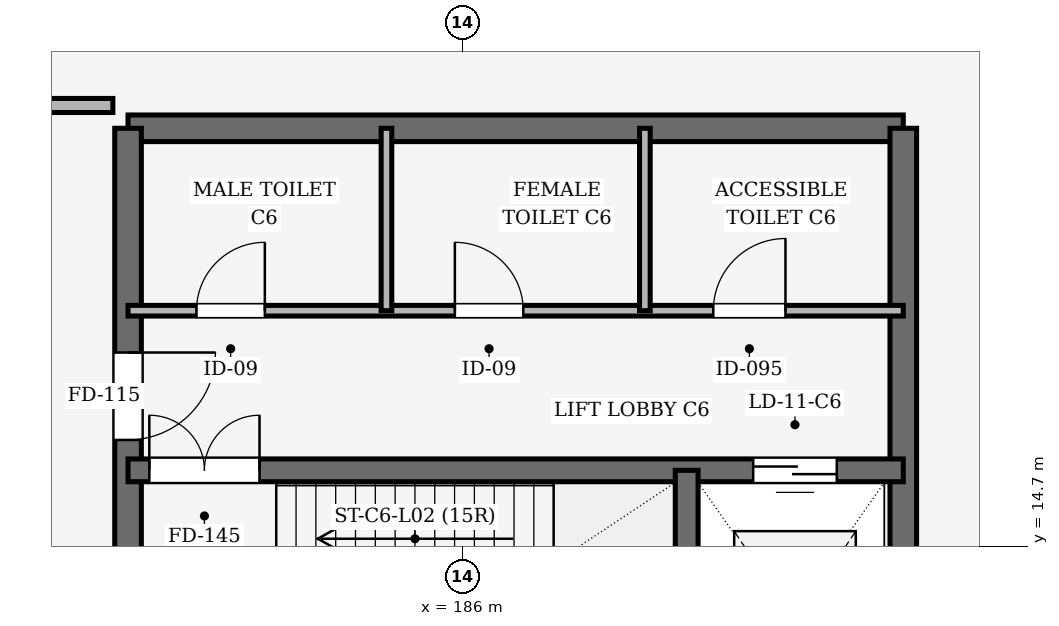
"""IFC4 building model, lengths in metres.
Left out: names, types, materials, properties, quantities, classifications, styles, units other than length and angle.
Written with IfcOpenShell. Run it as: python <this file> out.ifc"""

import sys

from ifc_helpers import new_model, si_unit, direction, frame, frame_2d, origin, place, context, subcontext, project, spatial, rectangle, extrude, element, fill, save


model = new_model("IFC4")
c1 = context("Model", 3, precision=1e-05, world=origin(), true_north=direction((0.0, 1.0)))
c2 = subcontext(c1, "Body", "Model", "MODEL_VIEW")
j1 = project(units=[si_unit("LENGTHUNIT", "METRE"), si_unit("PLANEANGLEUNIT", "RADIAN")], contexts=[c1])
p1 = place(None, origin())
s1 = spatial("IfcSite", under=j1, at=p1, CompositionType="ELEMENT")
p2 = place(p1, origin())
s2 = spatial("IfcBuilding", under=s1, at=p2, CompositionType="ELEMENT")
p3 = place(p2, frame((0.0, 0.0, 10.8)))
s3 = spatial("IfcBuildingStorey", under=s2, at=p3, CompositionType="ELEMENT", Elevation=10.8)
p4 = place(p3, frame((191.8, 20.2, 0.0), z_axis=(0.0, 0.0, 1.0), x_axis=(-1.0, 0.0, 0.0)))
e1 = element("IfcWall", 1, at=p4, inside=s3, PredefinedType="SHEAR", context=c2, shape_type="SweptSolid", body=[
    extrude(rectangle(XDim=10.2, YDim=0.35, at=frame_2d((5.1, 0.0))), origin(), (0.0, 0.0, 1.0), 5.4),
])
p5 = place(p3, frame((181.6, 20.2, 0.0), z_axis=(0.0, 0.0, 1.0), x_axis=(0.0, -1.0, 0.0)))
e2 = element("IfcWall", 2, at=p5, inside=s3, PredefinedType="SHEAR", context=c2, shape_type="SweptSolid", body=[
    extrude(rectangle(XDim=8.4, YDim=0.35, at=frame_2d((4.2, 0.0))), origin(), (0.0, 0.0, 1.0), 5.4),
])
p6 = place(p5, frame((2.95, 0.0, 0.0)))
e3 = element("IfcOpeningElement", 3, at=p6, cuts=e2, PredefinedType="OPENING", context=c2, shape_type="SweptSolid", body=[
    extrude(rectangle(XDim=1.15, YDim=2.15, at=frame_2d((0.575, 1.075))), frame((0.0, 0.185, 0.0), z_axis=(0.0, -1.0, 0.0), x_axis=(1.0, 0.0, 0.0)), (0.0, 0.0, 1.0), 0.37),
])
p7 = place(p3, frame((191.8, 11.8, 0.0), z_axis=(0.0, 0.0, 1.0), x_axis=(0.0, 1.0, 0.0)))
e4 = element("IfcWall", 4, at=p7, inside=s3, PredefinedType="SHEAR", context=c2, shape_type="SweptSolid", body=[
    extrude(rectangle(XDim=8.4, YDim=0.35, at=frame_2d((4.2, 0.0))), origin(), (0.0, 0.0, 1.0), 5.4),
])
p8 = place(p3, frame((181.6, 15.7, 0.0), z_axis=(0.0, 0.0, 1.0), x_axis=(1.0, 0.0, 0.0)))
e5 = element("IfcWall", 5, at=p8, inside=s3, PredefinedType="SHEAR", context=c2, shape_type="SweptSolid", body=[
    extrude(rectangle(XDim=10.2, YDim=0.3, at=frame_2d((5.1, 0.0))), origin(), (0.0, 0.0, 1.0), 5.4),
])
p9 = place(p8, frame((0.28, 0.0, 0.0)))
e6 = element("IfcOpeningElement", 6, at=p9, cuts=e5, PredefinedType="OPENING", context=c2, shape_type="SweptSolid", body=[
    extrude(rectangle(XDim=1.45, YDim=2.15, at=frame_2d((0.725, 1.075))), frame((0.0, 0.16, 0.0), z_axis=(0.0, -1.0, 0.0), x_axis=(1.0, 0.0, 0.0)), (0.0, 0.0, 1.0), 0.32),
])
p10 = place(p8, frame((8.225, 0.0, 0.0)))
e7 = element("IfcOpeningElement", 7, at=p10, cuts=e5, PredefinedType="OPENING", context=c2, shape_type="SweptSolid", body=[
    extrude(rectangle(XDim=1.1, YDim=2.15, at=frame_2d((0.55, 1.075))), frame((0.0, 0.16, 0.0), z_axis=(0.0, -1.0, 0.0), x_axis=(1.0, 0.0, 0.0)), (0.0, 0.0, 1.0), 0.32),
])
p11 = place(p3, frame((188.95, 11.8, 0.0), z_axis=(0.0, 0.0, 1.0), x_axis=(0.0, 1.0, 0.0)))
e8 = element("IfcWall", 8, at=p11, inside=s3, PredefinedType="SHEAR", context=c2, shape_type="SweptSolid", body=[
    extrude(rectangle(XDim=3.9, YDim=0.3, at=frame_2d((1.95, 0.0))), origin(), (0.0, 0.0, 1.0), 5.4),
])
p12 = place(p3, frame((181.6, 17.8, 0.0), z_axis=(0.0, 0.0, 1.0), x_axis=(1.0, 0.0, 0.0)))
e9 = element("IfcWall", 9, at=p12, inside=s3, PredefinedType="PARTITIONING", context=c2, shape_type="SweptSolid", body=[
    extrude(rectangle(XDim=10.2, YDim=0.14, at=frame_2d((5.1, 0.0))), origin(), (0.0, 0.0, 1.0), 4.435),
])
p13 = place(p12, frame((0.9, 0.0, 0.0)))
e10 = element("IfcOpeningElement", 10, at=p13, cuts=e9, PredefinedType="OPENING", context=c2, shape_type="SweptSolid", body=[
    extrude(rectangle(XDim=0.9, YDim=2.1, at=frame_2d((0.45, 1.05))), frame((0.0, 0.08, 0.0), z_axis=(0.0, -1.0, 0.0), x_axis=(1.0, 0.0, 0.0)), (0.0, 0.0, 1.0), 0.16),
])
p14 = place(p12, frame((4.3, 0.0, 0.0)))
e11 = element("IfcOpeningElement", 11, at=p14, cuts=e9, PredefinedType="OPENING", context=c2, shape_type="SweptSolid", body=[
    extrude(rectangle(XDim=0.9, YDim=2.1, at=frame_2d((0.45, 1.05))), frame((0.0, 0.08, 0.0), z_axis=(0.0, -1.0, 0.0), x_axis=(1.0, 0.0, 0.0)), (0.0, 0.0, 1.0), 0.16),
])
p15 = place(p12, frame((7.7, 0.0, 0.0)))
e12 = element("IfcOpeningElement", 12, at=p15, cuts=e9, PredefinedType="OPENING", context=c2, shape_type="SweptSolid", body=[
    extrude(rectangle(XDim=0.95, YDim=2.1, at=frame_2d((0.475, 1.05))), frame((0.0, 0.08, 0.0), z_axis=(0.0, -1.0, 0.0), x_axis=(1.0, 0.0, 0.0)), (0.0, 0.0, 1.0), 0.16),
])
for number, where, z_axis, x_axis in (
    (13, (185.0, 17.8, 0.0), (0.0, 0.0, 1.0), (0.0, 1.0, 0.0)),
    (14, (188.4, 17.8, 0.0), (0.0, 0.0, 1.0), (0.0, 1.0, 0.0)),
):
    element("IfcWall", number, at=place(p3, frame(where, z_axis=z_axis, x_axis=x_axis)), inside=s3, PredefinedType="PARTITIONING", context=c2, shape_type="SweptSolid", body=[
        extrude(rectangle(XDim=2.4, YDim=0.14, at=frame_2d((1.2, 0.0))), origin(), (0.0, 0.0, 1.0), 4.5),
    ])
p16 = place(p3, frame((137.8, 20.5, 0.0), z_axis=(0.0, 0.0, 1.0), x_axis=(1.0, 0.0, 0.0)))
e15 = element("IfcWall", 15, at=p16, inside=s3, PredefinedType="PARTITIONING", context=c2, shape_type="SweptSolid", body=[
    extrude(rectangle(XDim=43.6, YDim=0.185, at=frame_2d((21.8, 0.0))), origin(), (0.0, 0.0, 1.0), 3.6),
])
p17 = place(p16, frame((5.7, 0.0, 0.0)))
e16 = element("IfcOpeningElement", 16, at=p17, cuts=e15, PredefinedType="OPENING", context=c2, shape_type="SweptSolid", body=[
    extrude(rectangle(XDim=1.6, YDim=2.2, at=frame_2d((0.8, 1.1))), frame((0.0, 0.103, 0.0), z_axis=(0.0, -1.0, 0.0), x_axis=(1.0, 0.0, 0.0)), (0.0, 0.0, 1.0), 0.205),
])
p18 = place(p16, frame((28.7, 0.0, 0.0)))
e17 = element("IfcOpeningElement", 17, at=p18, cuts=e15, PredefinedType="OPENING", context=c2, shape_type="SweptSolid", body=[
    extrude(rectangle(XDim=1.6, YDim=2.2, at=frame_2d((0.8, 1.1))), frame((0.0, 0.103, 0.0), z_axis=(0.0, -1.0, 0.0), x_axis=(1.0, 0.0, 0.0)), (0.0, 0.0, 1.0), 0.205),
])
p19 = place(p16, frame((39.7, 0.0, 0.0)))
e18 = element("IfcOpeningElement", 18, at=p19, cuts=e15, PredefinedType="OPENING", context=c2, shape_type="SweptSolid", body=[
    extrude(rectangle(XDim=1.6, YDim=2.2, at=frame_2d((0.8, 1.1))), frame((0.0, 0.103, 0.0), z_axis=(0.0, -1.0, 0.0), x_axis=(1.0, 0.0, 0.0)), (0.0, 0.0, 1.0), 0.205),
])
p20 = place(p16, frame((16.7, 0.0, 0.0)))
e19 = element("IfcOpeningElement", 19, at=p20, cuts=e15, PredefinedType="OPENING", context=c2, shape_type="SweptSolid", body=[
    extrude(rectangle(XDim=1.6, YDim=2.2, at=frame_2d((0.8, 1.1))), frame((0.0, 0.103, 0.0), z_axis=(0.0, -1.0, 0.0), x_axis=(1.0, 0.0, 0.0)), (0.0, 0.0, 1.0), 0.205),
])
p21 = place(p6, origin())
e20 = element("IfcDoor", 20, at=p21, inside=s3, OperationType="SINGLE_SWING_LEFT", PredefinedType="DOOR", context=c2, shape_type="SweptSolid", body=[
    extrude(rectangle(XDim=1.15, YDim=2.15, at=frame_2d((0.575, 1.075))), frame((0.0, 0.025, 0.0), z_axis=(0.0, -1.0, 0.0), x_axis=(1.0, 0.0, 0.0)), (0.0, 0.0, 1.0), 0.05),
])
fill(e3, e20)
p22 = place(p9, origin())
e21 = element("IfcDoor", 21, at=p22, inside=s3, OperationType="DOUBLE_DOOR_SINGLE_SWING", PredefinedType="DOOR", context=c2, shape_type="SweptSolid", body=[
    extrude(rectangle(XDim=1.45, YDim=2.15, at=frame_2d((0.725, 1.075))), frame((0.0, 0.025, 0.0), z_axis=(0.0, -1.0, 0.0), x_axis=(1.0, 0.0, 0.0)), (0.0, 0.0, 1.0), 0.05),
])
fill(e6, e21)
p23 = place(p10, origin())
e22 = element("IfcDoor", 22, at=p23, inside=s3, OperationType="DOUBLE_DOOR_SLIDING", PredefinedType="DOOR", context=c2, shape_type="SweptSolid", body=[
    extrude(rectangle(XDim=1.1, YDim=2.15, at=frame_2d((0.55, 1.075))), frame((0.0, 0.025, 0.0), z_axis=(0.0, -1.0, 0.0), x_axis=(1.0, 0.0, 0.0)), (0.0, 0.0, 1.0), 0.05),
])
fill(e7, e22)
p24 = place(p13, origin())
e23 = element("IfcDoor", 23, at=p24, inside=s3, OperationType="SINGLE_SWING_RIGHT", PredefinedType="DOOR", context=c2, shape_type="SweptSolid", body=[
    extrude(rectangle(XDim=0.9, YDim=2.1, at=frame_2d((0.45, 1.05))), frame((0.0, 0.025, 0.0), z_axis=(0.0, -1.0, 0.0), x_axis=(1.0, 0.0, 0.0)), (0.0, 0.0, 1.0), 0.05),
])
fill(e10, e23)
p25 = place(p14, origin())
e24 = element("IfcDoor", 24, at=p25, inside=s3, OperationType="SINGLE_SWING_LEFT", PredefinedType="DOOR", context=c2, shape_type="SweptSolid", body=[
    extrude(rectangle(XDim=0.9, YDim=2.1, at=frame_2d((0.45, 1.05))), frame((0.0, 0.025, 0.0), z_axis=(0.0, -1.0, 0.0), x_axis=(1.0, 0.0, 0.0)), (0.0, 0.0, 1.0), 0.05),
])
fill(e11, e24)
p26 = place(p15, origin())
e25 = element("IfcDoor", 25, at=p26, inside=s3, OperationType="SINGLE_SWING_RIGHT", PredefinedType="DOOR", context=c2, shape_type="SweptSolid", body=[
    extrude(rectangle(XDim=0.95, YDim=2.1, at=frame_2d((0.475, 1.05))), frame((0.0, 0.025, 0.0), z_axis=(0.0, -1.0, 0.0), x_axis=(1.0, 0.0, 0.0)), (0.0, 0.0, 1.0), 0.05),
])
fill(e12, e25)
save(model, sys.argv[1])
